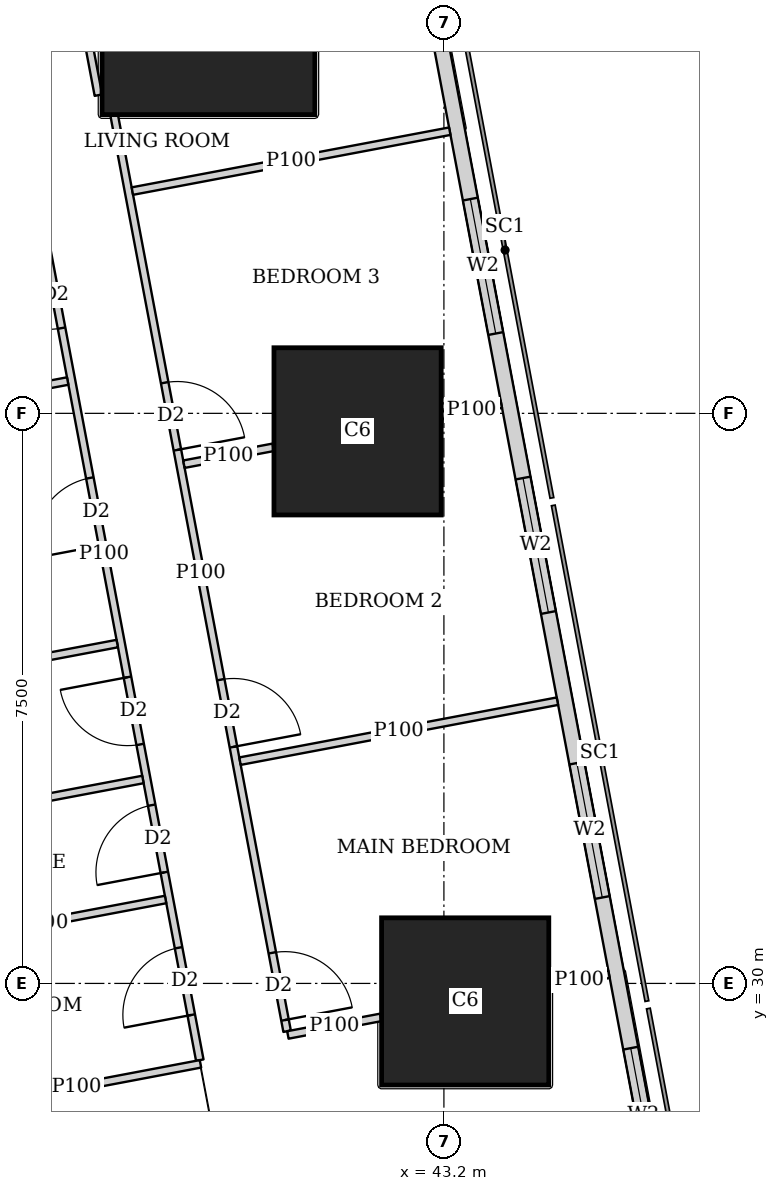
"""IFC4 building model, lengths in metres.
Left out: names, types, materials, properties, quantities, classifications, styles, units other than length and angle.
Written with IfcOpenShell. Run it as: python <this file> out.ifc"""

import sys

from ifc_helpers import new_model, si_unit, direction, frame, frame_2d, origin, origin_2d, place, context, subcontext, project, spatial, rectangle, extrude, element, fill, save


model = new_model("IFC4")
c1 = context("Model", 3, precision=1e-05, world=origin(), true_north=direction((0.0, 1.0)))
c2 = subcontext(c1, "Body", "Model", "MODEL_VIEW")
j1 = project(units=[si_unit("LENGTHUNIT", "METRE"), si_unit("PLANEANGLEUNIT", "RADIAN")], contexts=[c1])
p1 = place(None, origin())
s1 = spatial("IfcSite", under=j1, at=p1, CompositionType="ELEMENT")
p2 = place(p1, origin())
s2 = spatial("IfcBuilding", under=s1, at=p2, CompositionType="ELEMENT")
p3 = place(p2, frame((0.0, 0.0, 77.9)))
s3 = spatial("IfcBuildingStorey", under=s2, at=p3, CompositionType="ELEMENT", Elevation=77.9)
for number, where, z_axis, x_axis in (
    (1, (43.48, 29.763, 0.0), (0.0, 0.0, 1.0), (1.0, 0.0, 0.0)),
    (2, (42.064, 37.263, 0.0), (0.0, 0.0, 1.0), (1.0, 0.0, 0.0)),
):
    element("IfcColumn", number, at=place(p3, frame(where, z_axis=z_axis, x_axis=x_axis)), inside=s3, PredefinedType="COLUMN", context=c2, shape_type="SweptSolid", body=[
        extrude(rectangle(XDim=2.2, YDim=2.2, at=origin_2d()), origin(), (0.0, 0.0, 1.0), 3.75),
    ])
p4 = place(p3, frame((40.102, 42.83, 0.0), z_axis=(0.0, 0.0, 1.0), x_axis=(1.0, 0.0, 0.0)))
e3 = element("IfcColumn", 3, at=p4, inside=s3, PredefinedType="COLUMN", context=c2, shape_type="SweptSolid", body=[
    extrude(rectangle(XDim=2.8, YDim=2.8, at=origin_2d()), origin(), (0.0, 0.0, 1.0), 3.75),
])
p5 = place(p3, frame((50.653, 2.703, 0.0), z_axis=(0.0, 0.0, 1.0), x_axis=(-0.185612026696, 0.982623109613, 0.0)))
e4 = element("IfcWall", 4, at=p5, inside=s3, PredefinedType="SOLIDWALL", context=c2, shape_type="SweptSolid", body=[
    extrude(rectangle(XDim=41.393, YDim=0.2, at=frame_2d((20.697, 0.0))), origin(), (0.0, 0.0, 1.0), 3.5),
])
p6 = place(p5, frame((1.633, 0.0, 0.9)))
e5 = element("IfcOpeningElement", 5, at=p6, cuts=e4, PredefinedType="OPENING", context=c2, shape_type="SweptSolid", body=[
    extrude(rectangle(XDim=1.8, YDim=1.5, at=frame_2d((0.9, 0.75))), frame((0.0, 0.11, 0.0), z_axis=(0.0, -1.0, 0.0), x_axis=(1.0, 0.0, 0.0)), (0.0, 0.0, 1.0), 0.22),
])
p7 = place(p5, frame((6.032, 0.0, 0.9)))
e6 = element("IfcOpeningElement", 6, at=p7, cuts=e4, PredefinedType="OPENING", context=c2, shape_type="SweptSolid", body=[
    extrude(rectangle(XDim=1.8, YDim=1.5, at=frame_2d((0.9, 0.75))), frame((0.0, 0.11, 0.0), z_axis=(0.0, -1.0, 0.0), x_axis=(1.0, 0.0, 0.0)), (0.0, 0.0, 1.0), 0.22),
])
p8 = place(p5, frame((9.848, 0.0, 0.9)))
e7 = element("IfcOpeningElement", 7, at=p8, cuts=e4, PredefinedType="OPENING", context=c2, shape_type="SweptSolid", body=[
    extrude(rectangle(XDim=1.8, YDim=1.5, at=frame_2d((0.9, 0.75))), frame((0.0, 0.11, 0.0), z_axis=(0.0, -1.0, 0.0), x_axis=(1.0, 0.0, 0.0)), (0.0, 0.0, 1.0), 0.22),
])
p9 = place(p5, frame((13.664, 0.0, 0.9)))
e8 = element("IfcOpeningElement", 8, at=p9, cuts=e4, PredefinedType="OPENING", context=c2, shape_type="SweptSolid", body=[
    extrude(rectangle(XDim=1.8, YDim=1.5, at=frame_2d((0.9, 0.75))), frame((0.0, 0.11, 0.0), z_axis=(0.0, -1.0, 0.0), x_axis=(1.0, 0.0, 0.0)), (0.0, 0.0, 1.0), 0.22),
])
p10 = place(p5, frame((17.481, 0.0, 0.9)))
e9 = element("IfcOpeningElement", 9, at=p10, cuts=e4, PredefinedType="OPENING", context=c2, shape_type="SweptSolid", body=[
    extrude(rectangle(XDim=1.8, YDim=1.5, at=frame_2d((0.9, 0.75))), frame((0.0, 0.11, 0.0), z_axis=(0.0, -1.0, 0.0), x_axis=(1.0, 0.0, 0.0)), (0.0, 0.0, 1.0), 0.22),
])
p11 = place(p5, frame((21.297, 0.0, 0.9)))
e10 = element("IfcOpeningElement", 10, at=p11, cuts=e4, PredefinedType="OPENING", context=c2, shape_type="SweptSolid", body=[
    extrude(rectangle(XDim=1.8, YDim=1.5, at=frame_2d((0.9, 0.75))), frame((0.0, 0.11, 0.0), z_axis=(0.0, -1.0, 0.0), x_axis=(1.0, 0.0, 0.0)), (0.0, 0.0, 1.0), 0.22),
])
p12 = place(p5, frame((25.113, 0.0, 0.9)))
e11 = element("IfcOpeningElement", 11, at=p12, cuts=e4, PredefinedType="OPENING", context=c2, shape_type="SweptSolid", body=[
    extrude(rectangle(XDim=1.8, YDim=1.5, at=frame_2d((0.9, 0.75))), frame((0.0, 0.11, 0.0), z_axis=(0.0, -1.0, 0.0), x_axis=(1.0, 0.0, 0.0)), (0.0, 0.0, 1.0), 0.22),
])
p13 = place(p5, frame((28.93, 0.0, 0.9)))
e12 = element("IfcOpeningElement", 12, at=p13, cuts=e4, PredefinedType="OPENING", context=c2, shape_type="SweptSolid", body=[
    extrude(rectangle(XDim=1.8, YDim=1.5, at=frame_2d((0.9, 0.75))), frame((0.0, 0.11, 0.0), z_axis=(0.0, -1.0, 0.0), x_axis=(1.0, 0.0, 0.0)), (0.0, 0.0, 1.0), 0.22),
])
p14 = place(p5, frame((32.746, 0.0, 0.9)))
e13 = element("IfcOpeningElement", 13, at=p14, cuts=e4, PredefinedType="OPENING", context=c2, shape_type="SweptSolid", body=[
    extrude(rectangle(XDim=1.8, YDim=1.5, at=frame_2d((0.9, 0.75))), frame((0.0, 0.11, 0.0), z_axis=(0.0, -1.0, 0.0), x_axis=(1.0, 0.0, 0.0)), (0.0, 0.0, 1.0), 0.22),
])
p15 = place(p5, frame((36.481, 0.0, 0.9)))
e14 = element("IfcOpeningElement", 14, at=p15, cuts=e4, PredefinedType="OPENING", context=c2, shape_type="SweptSolid", body=[
    extrude(rectangle(XDim=1.8, YDim=1.5, at=frame_2d((0.9, 0.75))), frame((0.0, 0.11, 0.0), z_axis=(0.0, -1.0, 0.0), x_axis=(1.0, 0.0, 0.0)), (0.0, 0.0, 1.0), 0.22),
])
p16 = place(p3, frame((33.382, 45.65, 0.0), z_axis=(0.0, 0.0, 1.0), x_axis=(0.185593544777, -0.982626600565, 0.0)))
e15 = element("IfcWall", 15, at=p16, inside=s3, PredefinedType="SOLIDWALL", context=c2, shape_type="SweptSolid", body=[
    extrude(rectangle(XDim=47.118, YDim=0.15, at=frame_2d((23.559, 0.0))), origin(), (0.0, 0.0, 1.0), 2.2),
])
p17 = place(p16, frame((19.054, 0.0, 0.0)))
e16 = element("IfcOpeningElement", 16, at=p17, cuts=e15, PredefinedType="OPENING", context=c2, shape_type="SweptSolid", body=[
    extrude(rectangle(XDim=1.0, YDim=2.1, at=frame_2d((0.5, 1.05))), frame((0.0, 0.085, 0.0), z_axis=(0.0, -1.0, 0.0), x_axis=(1.0, 0.0, 0.0)), (0.0, 0.0, 1.0), 0.17),
])
p18 = place(p16, frame((22.87, 0.0, 0.0)))
e17 = element("IfcOpeningElement", 17, at=p18, cuts=e15, PredefinedType="OPENING", context=c2, shape_type="SweptSolid", body=[
    extrude(rectangle(XDim=1.0, YDim=2.1, at=frame_2d((0.5, 1.05))), frame((0.0, 0.085, 0.0), z_axis=(0.0, -1.0, 0.0), x_axis=(1.0, 0.0, 0.0)), (0.0, 0.0, 1.0), 0.17),
])
p19 = place(p16, frame((33.833, 0.0, 0.0)))
e18 = element("IfcOpeningElement", 18, at=p19, cuts=e15, PredefinedType="OPENING", context=c2, shape_type="SweptSolid", body=[
    extrude(rectangle(XDim=1.0, YDim=2.1, at=frame_2d((0.5, 1.05))), frame((0.0, 0.085, 0.0), z_axis=(0.0, -1.0, 0.0), x_axis=(1.0, 0.0, 0.0)), (0.0, 0.0, 1.0), 0.17),
])
p20 = place(p3, frame((38.654, 41.686, 0.0), z_axis=(0.0, 0.0, 1.0), x_axis=(-0.185676896978, 0.982610853761, 0.0)))
e19 = element("IfcWall", 19, at=p20, inside=s3, PredefinedType="PARTITIONING", context=c2, shape_type="SweptSolid", body=[
    extrude(rectangle(XDim=4.034, YDim=0.1, at=frame_2d((2.017, 0.0))), origin(), (0.0, 0.0, 1.0), 2.05),
])
p21 = place(p3, frame((38.862, 41.42, 0.0), z_axis=(0.0, 0.0, 1.0), x_axis=(0.185529020159, -0.982638785454, 0.0)))
e20 = element("IfcWall", 20, at=p21, inside=s3, PredefinedType="PARTITIONING", context=c2, shape_type="SweptSolid", body=[
    extrude(rectangle(XDim=12.262, YDim=0.1, at=frame_2d((6.131, 0.0))), origin(), (0.0, 0.0, 1.0), 2.5),
])
p22 = place(p21, frame((11.212, 0.0, 0.0)))
e21 = element("IfcOpeningElement", 21, at=p22, cuts=e20, PredefinedType="OPENING", context=c2, shape_type="SweptSolid", body=[
    extrude(rectangle(XDim=0.9, YDim=2.1, at=frame_2d((0.45, 1.05))), frame((0.0, 0.06, 0.0), z_axis=(0.0, -1.0, 0.0), x_axis=(1.0, 0.0, 0.0)), (0.0, 0.0, 1.0), 0.12),
])
p23 = place(p21, frame((7.555, 0.0, 0.0)))
e22 = element("IfcOpeningElement", 22, at=p23, cuts=e20, PredefinedType="OPENING", context=c2, shape_type="SweptSolid", body=[
    extrude(rectangle(XDim=0.9, YDim=2.1, at=frame_2d((0.45, 1.05))), frame((0.0, 0.06, 0.0), z_axis=(0.0, -1.0, 0.0), x_axis=(1.0, 0.0, 0.0)), (0.0, 0.0, 1.0), 0.12),
])
p24 = place(p21, frame((3.579, 0.0, 0.0)))
e23 = element("IfcOpeningElement", 23, at=p24, cuts=e20, PredefinedType="OPENING", context=c2, shape_type="SweptSolid", body=[
    extrude(rectangle(XDim=0.9, YDim=2.1, at=frame_2d((0.45, 1.05))), frame((0.0, 0.06, 0.0), z_axis=(0.0, -1.0, 0.0), x_axis=(1.0, 0.0, 0.0)), (0.0, 0.0, 1.0), 0.12),
])
p25 = place(p3, frame((37.473, 42.309, 0.0), z_axis=(0.0, 0.0, 1.0), x_axis=(0.185570636839, -0.982630927024, 0.0)))
e24 = element("IfcWall", 24, at=p25, inside=s3, PredefinedType="PARTITIONING", context=c2, shape_type="SweptSolid", body=[
    extrude(rectangle(XDim=13.553, YDim=0.1, at=frame_2d((6.777, 0.0))), origin(), (0.0, 0.0, 1.0), 2.5),
])
p26 = place(p25, frame((12.049, 0.0, 0.0)))
e25 = element("IfcOpeningElement", 25, at=p26, cuts=e24, PredefinedType="OPENING", context=c2, shape_type="SweptSolid", body=[
    extrude(rectangle(XDim=0.9, YDim=2.1, at=frame_2d((0.45, 1.05))), frame((0.0, 0.06, 0.0), z_axis=(0.0, -1.0, 0.0), x_axis=(1.0, 0.0, 0.0)), (0.0, 0.0, 1.0), 0.12),
])
p27 = place(p25, frame((8.427, 0.0, 0.0)))
e26 = element("IfcOpeningElement", 26, at=p27, cuts=e24, PredefinedType="OPENING", context=c2, shape_type="SweptSolid", body=[
    extrude(rectangle(XDim=0.9, YDim=2.1, at=frame_2d((0.45, 1.05))), frame((0.0, 0.06, 0.0), z_axis=(0.0, -1.0, 0.0), x_axis=(1.0, 0.0, 0.0)), (0.0, 0.0, 1.0), 0.12),
])
p28 = place(p25, frame((2.853, 0.0, 0.0)))
e27 = element("IfcOpeningElement", 27, at=p28, cuts=e24, PredefinedType="OPENING", context=c2, shape_type="SweptSolid", body=[
    extrude(rectangle(XDim=0.9, YDim=2.1, at=frame_2d((0.45, 1.05))), frame((0.0, 0.06, 0.0), z_axis=(0.0, -1.0, 0.0), x_axis=(1.0, 0.0, 0.0)), (0.0, 0.0, 1.0), 0.12),
])
p29 = place(p25, frame((10.14, 0.0, 0.0)))
e28 = element("IfcOpeningElement", 28, at=p29, cuts=e24, PredefinedType="OPENING", context=c2, shape_type="SweptSolid", body=[
    extrude(rectangle(XDim=0.9, YDim=2.1, at=frame_2d((0.45, 1.05))), frame((0.0, 0.06, 0.0), z_axis=(0.0, -1.0, 0.0), x_axis=(1.0, 0.0, 0.0)), (0.0, 0.0, 1.0), 0.12),
])
p30 = place(p25, frame((5.759, 0.0, 0.0)))
e29 = element("IfcOpeningElement", 29, at=p30, cuts=e24, PredefinedType="OPENING", context=c2, shape_type="SweptSolid", body=[
    extrude(rectangle(XDim=0.9, YDim=2.1, at=frame_2d((0.45, 1.05))), frame((0.0, 0.06, 0.0), z_axis=(0.0, -1.0, 0.0), x_axis=(1.0, 0.0, 0.0)), (0.0, 0.0, 1.0), 0.12),
])
p31 = place(p3, frame((43.277, 41.212, 0.0), z_axis=(0.0, 0.0, 1.0), x_axis=(-0.982665405803, -0.185387972203, 0.0)))
e30 = element("IfcWall", 30, at=p31, inside=s3, PredefinedType="PARTITIONING", context=c2, shape_type="SweptSolid", body=[
    extrude(rectangle(XDim=4.25, YDim=0.1, at=frame_2d((2.125, 0.0))), origin(), (0.0, 0.0, 1.0), 2.05),
])
p32 = place(p3, frame((43.955, 37.62, 0.0), z_axis=(0.0, 0.0, 1.0), x_axis=(-0.98247004097, -0.186420542316, 0.0)))
e31 = element("IfcWall", 31, at=p32, inside=s3, PredefinedType="PARTITIONING", context=c2, shape_type="SweptSolid", body=[
    extrude(rectangle(XDim=0.795, YDim=0.1, at=frame_2d((0.397, 0.0))), origin(), (0.0, 0.0, 1.0), 2.05),
])
p33 = place(p3, frame((40.954, 37.053, 0.0), z_axis=(0.0, 0.0, 1.0), x_axis=(-0.982628652346, -0.185582681276, 0.0)))
e32 = element("IfcWall", 32, at=p33, inside=s3, PredefinedType="PARTITIONING", context=c2, shape_type="SweptSolid", body=[
    extrude(rectangle(XDim=1.196, YDim=0.1, at=frame_2d((0.598, 0.0))), origin(), (0.0, 0.0, 1.0), 2.05),
])
p34 = place(p3, frame((44.693, 33.713, 0.0), z_axis=(0.0, 0.0, 1.0), x_axis=(-0.982623519589, -0.185609856287, 0.0)))
e33 = element("IfcWall", 33, at=p34, inside=s3, PredefinedType="PARTITIONING", context=c2, shape_type="SweptSolid", body=[
    extrude(rectangle(XDim=4.25, YDim=0.1, at=frame_2d((2.125, 0.0))), origin(), (0.0, 0.0, 1.0), 2.2),
])
p35 = place(p3, frame((45.372, 30.121, 0.0), z_axis=(0.0, 0.0, 1.0), x_axis=(-0.982512656401, -0.186195810938, 0.0)))
e34 = element("IfcWall", 34, at=p35, inside=s3, PredefinedType="PARTITIONING", context=c2, shape_type="SweptSolid", body=[
    extrude(rectangle(XDim=0.796, YDim=0.1, at=frame_2d((0.398, 0.0))), origin(), (0.0, 0.0, 1.0), 3.5),
])
p36 = place(p3, frame((42.37, 29.553, 0.0), z_axis=(0.0, 0.0, 1.0), x_axis=(-0.98263602344, -0.185543648338, 0.0)))
e35 = element("IfcWall", 35, at=p36, inside=s3, PredefinedType="PARTITIONING", context=c2, shape_type="SweptSolid", body=[
    extrude(rectangle(XDim=1.245, YDim=0.1, at=frame_2d((0.623, 0.0))), origin(), (0.0, 0.0, 1.0), 2.5),
])
p37 = place(p3, frame((38.25, 37.925, 0.0), z_axis=(0.0, 0.0, 1.0), x_axis=(-0.982626127294, -0.185596050493, 0.0)))
e36 = element("IfcWall", 36, at=p37, inside=s3, PredefinedType="PARTITIONING", context=c2, shape_type="SweptSolid", body=[
    extrude(rectangle(XDim=1.465, YDim=0.1, at=frame_2d((0.733, 0.0))), origin(), (0.0, 0.0, 1.0), 3.5),
])
p38 = place(p3, frame((39.24, 32.683, 0.0), z_axis=(0.0, 0.0, 1.0), x_axis=(-0.982607026909, -0.185697147715, 0.0)))
e37 = element("IfcWall", 37, at=p38, inside=s3, PredefinedType="PARTITIONING", context=c2, shape_type="SweptSolid", body=[
    extrude(rectangle(XDim=3.275, YDim=0.1, at=frame_2d((1.637, 0.0))), origin(), (0.0, 0.0, 1.0), 3.5),
])
p39 = place(p3, frame((39.997, 28.942, 0.0), z_axis=(0.0, 0.0, 1.0), x_axis=(-0.982569883123, -0.185893584556, 0.0)))
e38 = element("IfcWall", 38, at=p39, inside=s3, PredefinedType="PARTITIONING", context=c2, shape_type="SweptSolid", body=[
    extrude(rectangle(XDim=3.324, YDim=0.1, at=frame_2d((1.662, 0.0))), origin(), (0.0, 0.0, 1.0), 3.5),
])
p40 = place(p3, frame((39.538, 31.104, 0.0), z_axis=(0.0, 0.0, 1.0), x_axis=(-0.982610347627, -0.185679575441, 0.0)))
e39 = element("IfcWall", 39, at=p40, inside=s3, PredefinedType="PARTITIONING", context=c2, shape_type="SweptSolid", body=[
    extrude(rectangle(XDim=3.274, YDim=0.1, at=frame_2d((1.637, 0.0))), origin(), (0.0, 0.0, 1.0), 2.5),
])
p41 = place(p3, frame((38.902, 34.471, 0.0), z_axis=(0.0, 0.0, 1.0), x_axis=(-0.982664729897, -0.18539155487, 0.0)))
e40 = element("IfcWall", 40, at=p41, inside=s3, PredefinedType="PARTITIONING", context=c2, shape_type="SweptSolid", body=[
    extrude(rectangle(XDim=3.274, YDim=0.1, at=frame_2d((1.637, 0.0))), origin(), (0.0, 0.0, 1.0), 3.5),
])
p42 = place(p12, origin())
e41 = element("IfcWindow", 41, at=p42, inside=s3, PartitioningType="SINGLE_PANEL", PredefinedType="WINDOW", context=c2, shape_type="SweptSolid", body=[
    extrude(rectangle(XDim=1.8, YDim=1.5, at=frame_2d((0.9, 0.75))), frame((0.0, 0.03, 0.0), z_axis=(0.0, -1.0, 0.0), x_axis=(1.0, 0.0, 0.0)), (0.0, 0.0, 1.0), 0.06),
])
fill(e11, e41)
p43 = place(p13, origin())
e42 = element("IfcWindow", 42, at=p43, inside=s3, PartitioningType="SINGLE_PANEL", PredefinedType="WINDOW", context=c2, shape_type="SweptSolid", body=[
    extrude(rectangle(XDim=1.8, YDim=1.5, at=frame_2d((0.9, 0.75))), frame((0.0, 0.03, 0.0), z_axis=(0.0, -1.0, 0.0), x_axis=(1.0, 0.0, 0.0)), (0.0, 0.0, 1.0), 0.06),
])
fill(e12, e42)
p44 = place(p14, origin())
e43 = element("IfcWindow", 43, at=p44, inside=s3, PartitioningType="SINGLE_PANEL", PredefinedType="WINDOW", context=c2, shape_type="SweptSolid", body=[
    extrude(rectangle(XDim=1.8, YDim=1.5, at=frame_2d((0.9, 0.75))), frame((0.0, 0.03, 0.0), z_axis=(0.0, -1.0, 0.0), x_axis=(1.0, 0.0, 0.0)), (0.0, 0.0, 1.0), 0.06),
])
fill(e13, e43)
p45 = place(p15, origin())
e44 = element("IfcWindow", 44, at=p45, inside=s3, PartitioningType="SINGLE_PANEL", PredefinedType="WINDOW", context=c2, shape_type="SweptSolid", body=[
    extrude(rectangle(XDim=1.8, YDim=1.5, at=frame_2d((0.9, 0.75))), frame((0.0, 0.03, 0.0), z_axis=(0.0, -1.0, 0.0), x_axis=(1.0, 0.0, 0.0)), (0.0, 0.0, 1.0), 0.06),
])
fill(e14, e44)
p46 = place(p22, origin())
e45 = element("IfcDoor", 45, at=p46, inside=s3, OperationType="SINGLE_SWING_RIGHT", PredefinedType="DOOR", context=c2, shape_type="SweptSolid", body=[
    extrude(rectangle(XDim=0.9, YDim=2.1, at=frame_2d((0.45, 1.05))), frame((0.0, 0.025, 0.0), z_axis=(0.0, -1.0, 0.0), x_axis=(1.0, 0.0, 0.0)), (0.0, 0.0, 1.0), 0.05),
])
fill(e21, e45)
p47 = place(p23, origin())
e46 = element("IfcDoor", 46, at=p47, inside=s3, OperationType="SINGLE_SWING_RIGHT", PredefinedType="DOOR", context=c2, shape_type="SweptSolid", body=[
    extrude(rectangle(XDim=0.9, YDim=2.1, at=frame_2d((0.45, 1.05))), frame((0.0, 0.025, 0.0), z_axis=(0.0, -1.0, 0.0), x_axis=(1.0, 0.0, 0.0)), (0.0, 0.0, 1.0), 0.05),
])
fill(e22, e46)
p48 = place(p24, origin())
e47 = element("IfcDoor", 47, at=p48, inside=s3, OperationType="SINGLE_SWING_RIGHT", PredefinedType="DOOR", context=c2, shape_type="SweptSolid", body=[
    extrude(rectangle(XDim=0.9, YDim=2.1, at=frame_2d((0.45, 1.05))), frame((0.0, 0.025, 0.0), z_axis=(0.0, -1.0, 0.0), x_axis=(1.0, 0.0, 0.0)), (0.0, 0.0, 1.0), 0.05),
])
fill(e23, e47)
p49 = place(p26, origin())
e48 = element("IfcDoor", 48, at=p49, inside=s3, OperationType="SINGLE_SWING_LEFT", PredefinedType="DOOR", context=c2, shape_type="SweptSolid", body=[
    extrude(rectangle(XDim=0.9, YDim=2.1, at=frame_2d((0.45, 1.05))), frame((0.0, 0.025, 0.0), z_axis=(0.0, -1.0, 0.0), x_axis=(1.0, 0.0, 0.0)), (0.0, 0.0, 1.0), 0.05),
])
fill(e25, e48)
p50 = place(p27, origin())
e49 = element("IfcDoor", 49, at=p50, inside=s3, OperationType="SINGLE_SWING_RIGHT", PredefinedType="DOOR", context=c2, shape_type="SweptSolid", body=[
    extrude(rectangle(XDim=0.9, YDim=2.1, at=frame_2d((0.45, 1.05))), frame((0.0, 0.025, 0.0), z_axis=(0.0, -1.0, 0.0), x_axis=(1.0, 0.0, 0.0)), (0.0, 0.0, 1.0), 0.05),
])
fill(e26, e49)
p51 = place(p28, origin())
e50 = element("IfcDoor", 50, at=p51, inside=s3, OperationType="SINGLE_SWING_RIGHT", PredefinedType="DOOR", context=c2, shape_type="SweptSolid", body=[
    extrude(rectangle(XDim=0.9, YDim=2.1, at=frame_2d((0.45, 1.05))), frame((0.0, 0.025, 0.0), z_axis=(0.0, -1.0, 0.0), x_axis=(1.0, 0.0, 0.0)), (0.0, 0.0, 1.0), 0.05),
])
fill(e27, e50)
p52 = place(p29, origin())
e51 = element("IfcDoor", 51, at=p52, inside=s3, OperationType="SINGLE_SWING_LEFT", PredefinedType="DOOR", context=c2, shape_type="SweptSolid", body=[
    extrude(rectangle(XDim=0.9, YDim=2.1, at=frame_2d((0.45, 1.05))), frame((0.0, 0.025, 0.0), z_axis=(0.0, -1.0, 0.0), x_axis=(1.0, 0.0, 0.0)), (0.0, 0.0, 1.0), 0.05),
])
fill(e28, e51)
p53 = place(p30, origin())
e52 = element("IfcDoor", 52, at=p53, inside=s3, OperationType="SINGLE_SWING_LEFT", PredefinedType="DOOR", context=c2, shape_type="SweptSolid", body=[
    extrude(rectangle(XDim=0.9, YDim=2.1, at=frame_2d((0.45, 1.05))), frame((0.0, 0.025, 0.0), z_axis=(0.0, -1.0, 0.0), x_axis=(1.0, 0.0, 0.0)), (0.0, 0.0, 1.0), 0.05),
])
fill(e29, e52)
save(model, sys.argv[1])
